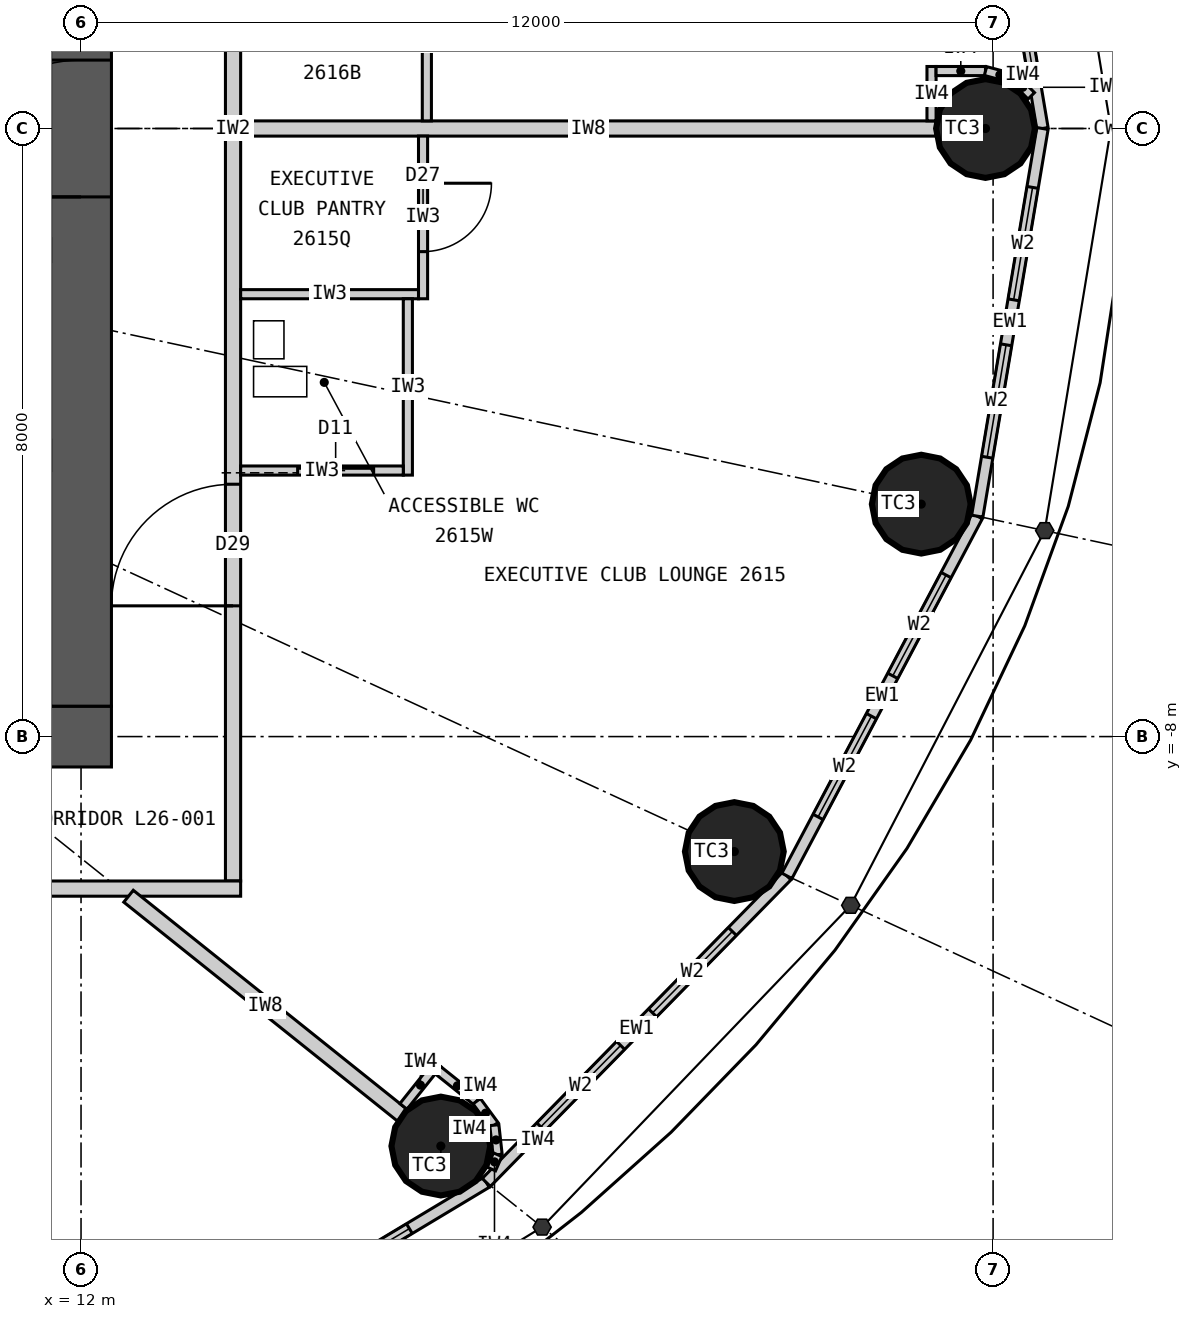
"""IFC4 building model, lengths in metres.
Left out: names, types, materials, properties, quantities, classifications, styles, units other than length and angle.
Written with IfcOpenShell. Run it as: python <this file> out.ifc"""

import sys

from ifc_helpers import new_model, si_unit, direction, frame, frame_2d, origin, origin_2d, place, context, subcontext, project, spatial, rectangle, circle, extrude, element, fill, save


model = new_model("IFC4")
c1 = context("Model", 3, precision=1e-05, world=origin(), true_north=direction((0.0, 1.0)))
c2 = subcontext(c1, "Body", "Model", "MODEL_VIEW")
j1 = project(units=[si_unit("LENGTHUNIT", "METRE"), si_unit("PLANEANGLEUNIT", "RADIAN")], contexts=[c1])
p1 = place(None, origin())
s1 = spatial("IfcSite", under=j1, at=p1, CompositionType="ELEMENT")
p2 = place(p1, origin())
s2 = spatial("IfcBuilding", under=s1, at=p2, CompositionType="ELEMENT")
p3 = place(p2, frame((0.0, 0.0, 105.6)))
s3 = spatial("IfcBuildingStorey", under=s2, at=p3, CompositionType="ELEMENT", Elevation=105.6)
for number, where, z_axis, x_axis in (
    (1, (23.9, 0.0, 0.0), (0.0, 0.0, 1.0), (1.0, 0.0, 0.0)),
    (2, (16.734, -13.387, 0.0), (0.0, 0.0, 1.0), (1.0, 0.0, 0.0)),
    (3, (20.596, -9.513, 0.0), (0.0, 0.0, 1.0), (1.0, 0.0, 0.0)),
    (4, (23.055, -4.942, 0.0), (0.0, 0.0, 1.0), (1.0, 0.0, 0.0)),
):
    element("IfcColumn", number, at=place(p3, frame(where, z_axis=z_axis, x_axis=x_axis)), inside=s3, PredefinedType="COLUMN", context=c2, shape_type="SweptSolid", body=[
        extrude(circle(Radius=0.65, at=origin_2d()), origin(), (0.0, 0.0, 1.0), 3.3),
    ])
p4 = place(p3, frame((12.4, -8.0, 0.0), z_axis=(0.0, 0.0, 1.0), x_axis=(-1.0, 0.0, 0.0)))
e5 = element("IfcWall", 5, at=p4, inside=s3, PredefinedType="SHEAR", context=c2, shape_type="SweptSolid", body=[
    extrude(rectangle(XDim=24.8, YDim=0.8, at=frame_2d((12.4, 0.0))), origin(), (0.0, 0.0, 1.0), 3.3),
])
p5 = place(p4, frame((11.1, 0.0, 0.0)))
e6 = element("IfcOpeningElement", 6, at=p5, cuts=e5, PredefinedType="OPENING", context=c2, shape_type="SweptSolid", body=[
    extrude(rectangle(XDim=1.2, YDim=2.2, at=frame_2d((0.6, 1.1))), frame((0.0, 0.41, 0.0), z_axis=(0.0, -1.0, 0.0), x_axis=(1.0, 0.0, 0.0)), (0.0, 0.0, 1.0), 0.82),
])
p6 = place(p4, frame((18.7, 0.0, 0.0)))
e7 = element("IfcOpeningElement", 7, at=p6, cuts=e5, PredefinedType="OPENING", context=c2, shape_type="SweptSolid", body=[
    extrude(rectangle(XDim=0.9, YDim=2.2, at=frame_2d((0.45, 1.1))), frame((0.0, 0.41, 0.0), z_axis=(0.0, -1.0, 0.0), x_axis=(1.0, 0.0, 0.0)), (0.0, 0.0, 1.0), 0.82),
])
p7 = place(p3, frame((12.0, -7.6, 0.0), z_axis=(0.0, 0.0, 1.0), x_axis=(0.0, 1.0, 0.0)))
e8 = element("IfcWall", 8, at=p7, inside=s3, PredefinedType="SHEAR", context=c2, shape_type="SweptSolid", body=[
    extrude(rectangle(XDim=15.2, YDim=0.8, at=frame_2d((7.6, 0.0))), origin(), (0.0, 0.0, 1.0), 3.3),
])
p8 = place(p7, frame((6.7, 0.0, 0.0)))
e9 = element("IfcOpeningElement", 9, at=p8, cuts=e8, PredefinedType="OPENING", context=c2, shape_type="SweptSolid", body=[
    extrude(rectangle(XDim=1.8, YDim=2.2, at=frame_2d((0.9, 1.1))), frame((0.0, 0.41, 0.0), z_axis=(0.0, -1.0, 0.0), x_axis=(1.0, 0.0, 0.0)), (0.0, 0.0, 1.0), 0.82),
])
p9 = place(p3, frame((24.65, 0.0, 0.0), z_axis=(0.0, 0.0, 1.0), x_axis=(-0.165883894218, 0.986145290329, 0.0)))
e10 = element("IfcWall", 10, at=p9, inside=s3, PredefinedType="ELEMENTEDWALL", context=c2, shape_type="SweptSolid", body=[
    extrude(rectangle(XDim=5.172, YDim=0.15, at=frame_2d((2.586, 0.0))), origin(), (0.0, 0.0, 1.0), 3.12),
])
p10 = place(p9, frame((0.786, 0.0, 0.9)))
e11 = element("IfcOpeningElement", 11, at=p10, cuts=e10, PredefinedType="OPENING", context=c2, shape_type="SweptSolid", body=[
    extrude(rectangle(XDim=1.5, YDim=1.9, at=frame_2d((0.75, 0.95))), frame((0.0, 0.085, 0.0), z_axis=(0.0, -1.0, 0.0), x_axis=(1.0, 0.0, 0.0)), (0.0, 0.0, 1.0), 0.17),
])
p11 = place(p9, frame((2.886, 0.0, 0.9)))
e12 = element("IfcOpeningElement", 12, at=p11, cuts=e10, PredefinedType="OPENING", context=c2, shape_type="SweptSolid", body=[
    extrude(rectangle(XDim=1.5, YDim=1.9, at=frame_2d((0.75, 0.95))), frame((0.0, 0.085, 0.0), z_axis=(0.0, -1.0, 0.0), x_axis=(1.0, 0.0, 0.0)), (0.0, 0.0, 1.0), 0.17),
])
p12 = place(p3, frame((12.221, -16.935, 0.0), z_axis=(0.0, 0.0, 1.0), x_axis=(0.857308573723, 0.514802884044, 0.0)))
e13 = element("IfcWall", 13, at=p12, inside=s3, PredefinedType="ELEMENTEDWALL", context=c2, shape_type="SweptSolid", body=[
    extrude(rectangle(XDim=5.961, YDim=0.15, at=frame_2d((2.98, 0.0))), origin(), (0.0, 0.0, 1.0), 3.12),
])
p13 = place(p12, frame((1.181, 0.0, 0.9)))
e14 = element("IfcOpeningElement", 14, at=p13, cuts=e13, PredefinedType="OPENING", context=c2, shape_type="SweptSolid", body=[
    extrude(rectangle(XDim=1.5, YDim=1.9, at=frame_2d((0.75, 0.95))), frame((0.0, 0.085, 0.0), z_axis=(0.0, -1.0, 0.0), x_axis=(1.0, 0.0, 0.0)), (0.0, 0.0, 1.0), 0.17),
])
p14 = place(p12, frame((3.281, 0.0, 0.9)))
e15 = element("IfcOpeningElement", 15, at=p14, cuts=e13, PredefinedType="OPENING", context=c2, shape_type="SweptSolid", body=[
    extrude(rectangle(XDim=1.5, YDim=1.9, at=frame_2d((0.75, 0.95))), frame((0.0, 0.085, 0.0), z_axis=(0.0, -1.0, 0.0), x_axis=(1.0, 0.0, 0.0)), (0.0, 0.0, 1.0), 0.17),
])
p15 = place(p3, frame((17.332, -13.866, 0.0), z_axis=(0.0, 0.0, 1.0), x_axis=(0.700136650834, 0.714008872605, 0.0)))
e16 = element("IfcWall", 16, at=p15, inside=s3, PredefinedType="ELEMENTEDWALL", context=c2, shape_type="SweptSolid", body=[
    extrude(rectangle(XDim=5.649, YDim=0.15, at=frame_2d((2.825, 0.0))), origin(), (0.0, 0.0, 1.0), 3.12),
])
p16 = place(p15, frame((1.025, 0.0, 0.9)))
e17 = element("IfcOpeningElement", 17, at=p16, cuts=e16, PredefinedType="OPENING", context=c2, shape_type="SweptSolid", body=[
    extrude(rectangle(XDim=1.5, YDim=1.9, at=frame_2d((0.75, 0.95))), frame((0.0, 0.085, 0.0), z_axis=(0.0, -1.0, 0.0), x_axis=(1.0, 0.0, 0.0)), (0.0, 0.0, 1.0), 0.17),
])
p17 = place(p15, frame((3.125, 0.0, 0.9)))
e18 = element("IfcOpeningElement", 18, at=p17, cuts=e16, PredefinedType="OPENING", context=c2, shape_type="SweptSolid", body=[
    extrude(rectangle(XDim=1.5, YDim=1.9, at=frame_2d((0.75, 0.95))), frame((0.0, 0.085, 0.0), z_axis=(0.0, -1.0, 0.0), x_axis=(1.0, 0.0, 0.0)), (0.0, 0.0, 1.0), 0.17),
])
p18 = place(p3, frame((21.287, -9.832, 0.0), z_axis=(0.0, 0.0, 1.0), x_axis=(0.467814388454, 0.883826735257, 0.0)))
e19 = element("IfcWall", 19, at=p18, inside=s3, PredefinedType="ELEMENTEDWALL", context=c2, shape_type="SweptSolid", body=[
    extrude(rectangle(XDim=5.354, YDim=0.15, at=frame_2d((2.677, 0.0))), origin(), (0.0, 0.0, 1.0), 3.12),
])
p19 = place(p18, frame((0.877, 0.0, 0.9)))
e20 = element("IfcOpeningElement", 20, at=p19, cuts=e19, PredefinedType="OPENING", context=c2, shape_type="SweptSolid", body=[
    extrude(rectangle(XDim=1.5, YDim=1.9, at=frame_2d((0.75, 0.95))), frame((0.0, 0.085, 0.0), z_axis=(0.0, -1.0, 0.0), x_axis=(1.0, 0.0, 0.0)), (0.0, 0.0, 1.0), 0.17),
])
p20 = place(p18, frame((2.977, 0.0, 0.9)))
e21 = element("IfcOpeningElement", 21, at=p20, cuts=e19, PredefinedType="OPENING", context=c2, shape_type="SweptSolid", body=[
    extrude(rectangle(XDim=1.5, YDim=1.9, at=frame_2d((0.75, 0.95))), frame((0.0, 0.085, 0.0), z_axis=(0.0, -1.0, 0.0), x_axis=(1.0, 0.0, 0.0)), (0.0, 0.0, 1.0), 0.17),
])
p21 = place(p3, frame((23.792, -5.1, 0.0), z_axis=(0.0, 0.0, 1.0), x_axis=(0.165883894218, 0.986145290329, 0.0)))
e22 = element("IfcWall", 22, at=p21, inside=s3, PredefinedType="ELEMENTEDWALL", context=c2, shape_type="SweptSolid", body=[
    extrude(rectangle(XDim=5.172, YDim=0.15, at=frame_2d((2.586, 0.0))), origin(), (0.0, 0.0, 1.0), 3.12),
])
p22 = place(p21, frame((0.786, 0.0, 0.9)))
e23 = element("IfcOpeningElement", 23, at=p22, cuts=e22, PredefinedType="OPENING", context=c2, shape_type="SweptSolid", body=[
    extrude(rectangle(XDim=1.5, YDim=1.9, at=frame_2d((0.75, 0.95))), frame((0.0, 0.085, 0.0), z_axis=(0.0, -1.0, 0.0), x_axis=(1.0, 0.0, 0.0)), (0.0, 0.0, 1.0), 0.17),
])
p23 = place(p21, frame((2.886, 0.0, 0.9)))
e24 = element("IfcOpeningElement", 24, at=p23, cuts=e22, PredefinedType="OPENING", context=c2, shape_type="SweptSolid", body=[
    extrude(rectangle(XDim=1.5, YDim=1.9, at=frame_2d((0.75, 0.95))), frame((0.0, 0.085, 0.0), z_axis=(0.0, -1.0, 0.0), x_axis=(1.0, 0.0, 0.0)), (0.0, 0.0, 1.0), 0.17),
])
p24 = place(p3, frame((14.0, -9.9, 0.0), z_axis=(0.0, 0.0, 1.0), x_axis=(0.0, 1.0, 0.0)))
e25 = element("IfcWall", 25, at=p24, inside=s3, PredefinedType="PARTITIONING", context=c2, shape_type="SweptSolid", body=[
    extrude(rectangle(XDim=19.8, YDim=0.2, at=frame_2d((9.9, 0.0))), origin(), (0.0, 0.0, 1.0), 3.12),
])
p25 = place(p24, frame((3.62, 0.0, 0.0)))
e26 = element("IfcOpeningElement", 26, at=p25, cuts=e25, PredefinedType="OPENING", context=c2, shape_type="SweptSolid", body=[
    extrude(rectangle(XDim=1.6, YDim=2.4, at=frame_2d((0.8, 1.2))), frame((0.0, 0.11, 0.0), z_axis=(0.0, -1.0, 0.0), x_axis=(1.0, 0.0, 0.0)), (0.0, 0.0, 1.0), 0.22),
])
p26 = place(p24, frame((12.26, 0.0, 0.0)))
e27 = element("IfcOpeningElement", 27, at=p26, cuts=e25, PredefinedType="OPENING", context=c2, shape_type="SweptSolid", body=[
    extrude(rectangle(XDim=1.0, YDim=2.2, at=frame_2d((0.5, 1.1))), frame((0.0, 0.11, 0.0), z_axis=(0.0, -1.0, 0.0), x_axis=(1.0, 0.0, 0.0)), (0.0, 0.0, 1.0), 0.22),
])
p27 = place(p24, frame((17.777, 0.0, 0.0)))
e28 = element("IfcOpeningElement", 28, at=p27, cuts=e25, PredefinedType="OPENING", context=c2, shape_type="SweptSolid", body=[
    extrude(rectangle(XDim=1.0, YDim=2.2, at=frame_2d((0.5, 1.1))), frame((0.0, 0.11, 0.0), z_axis=(0.0, -1.0, 0.0), x_axis=(1.0, 0.0, 0.0)), (0.0, 0.0, 1.0), 0.22),
])
p28 = place(p3, frame((14.1, -10.0, 0.0), z_axis=(0.0, 0.0, 1.0), x_axis=(-1.0, 0.0, 0.0)))
e29 = element("IfcWall", 29, at=p28, inside=s3, PredefinedType="PARTITIONING", context=c2, shape_type="SweptSolid", body=[
    extrude(rectangle(XDim=10.817, YDim=0.2, at=frame_2d((5.409, 0.0))), origin(), (0.0, 0.0, 1.0), 3.12),
])
p29 = place(p3, frame((14.1, 0.0, 0.0), z_axis=(0.0, 0.0, 1.0), x_axis=(1.0, 0.0, 0.0)))
e30 = element("IfcWall", 30, at=p29, inside=s3, PredefinedType="PARTITIONING", context=c2, shape_type="SweptSolid", body=[
    extrude(rectangle(XDim=9.15, YDim=0.2, at=frame_2d((4.575, 0.0))), origin(), (0.0, 0.0, 1.0), 2.27),
])
p30 = place(p3, frame((12.625, -10.1, 0.0), z_axis=(0.0, 0.0, 1.0), x_axis=(0.780863644897, -0.624701503182, 0.0)))
e31 = element("IfcWall", 31, at=p30, inside=s3, PredefinedType="PARTITIONING", context=c2, shape_type="SweptSolid", body=[
    extrude(rectangle(XDim=4.612, YDim=0.2, at=frame_2d((2.306, 0.0))), origin(), (0.0, 0.0, 1.0), 2.27),
])
p31 = place(p3, frame((16.5, -0.1, 0.0), z_axis=(0.0, 0.0, 1.0), x_axis=(0.0, -1.0, 0.0)))
e32 = element("IfcWall", 32, at=p31, inside=s3, PredefinedType="PARTITIONING", context=c2, shape_type="SweptSolid", body=[
    extrude(rectangle(XDim=2.14, YDim=0.12, at=frame_2d((1.07, 0.0))), origin(), (0.0, 0.0, 1.0), 3.12),
])
p32 = place(p31, frame((0.62, 0.0, 0.0)))
e33 = element("IfcOpeningElement", 33, at=p32, cuts=e32, PredefinedType="OPENING", context=c2, shape_type="SweptSolid", body=[
    extrude(rectangle(XDim=0.9, YDim=2.1, at=frame_2d((0.45, 1.05))), frame((0.0, 0.07, 0.0), z_axis=(0.0, -1.0, 0.0), x_axis=(1.0, 0.0, 0.0)), (0.0, 0.0, 1.0), 0.14),
])
p33 = place(p3, frame((14.1, -2.18, 0.0), z_axis=(0.0, 0.0, 1.0), x_axis=(1.0, 0.0, 0.0)))
e34 = element("IfcWall", 34, at=p33, inside=s3, PredefinedType="PARTITIONING", context=c2, shape_type="SweptSolid", body=[
    extrude(rectangle(XDim=2.34, YDim=0.12, at=frame_2d((1.17, 0.0))), origin(), (0.0, 0.0, 1.0), 3.12),
])
p34 = place(p3, frame((16.3, -2.24, 0.0), z_axis=(0.0, 0.0, 1.0), x_axis=(0.0, -1.0, 0.0)))
e35 = element("IfcWall", 35, at=p34, inside=s3, PredefinedType="PARTITIONING", context=c2, shape_type="SweptSolid", body=[
    extrude(rectangle(XDim=2.32, YDim=0.12, at=frame_2d((1.16, 0.0))), origin(), (0.0, 0.0, 1.0), 3.12),
])
p35 = place(p3, frame((14.1, -4.5, 0.0), z_axis=(0.0, 0.0, 1.0), x_axis=(1.0, 0.0, 0.0)))
e36 = element("IfcWall", 36, at=p35, inside=s3, PredefinedType="PARTITIONING", context=c2, shape_type="SweptSolid", body=[
    extrude(rectangle(XDim=2.14, YDim=0.12, at=frame_2d((1.07, 0.0))), origin(), (0.0, 0.0, 1.0), 3.12),
])
p36 = place(p35, frame((0.75, 0.0, 0.0)))
e37 = element("IfcOpeningElement", 37, at=p36, cuts=e36, PredefinedType="OPENING", context=c2, shape_type="SweptSolid", body=[
    extrude(rectangle(XDim=1.0, YDim=2.2, at=frame_2d((0.5, 1.1))), frame((0.0, 0.07, 0.0), z_axis=(0.0, -1.0, 0.0), x_axis=(1.0, 0.0, 0.0)), (0.0, 0.0, 1.0), 0.14),
])
p37 = place(p3, frame((16.55, 0.1, 0.0), z_axis=(0.0, 0.0, 1.0), x_axis=(0.0, 1.0, 0.0)))
e38 = element("IfcWall", 38, at=p37, inside=s3, PredefinedType="PARTITIONING", context=c2, shape_type="SweptSolid", body=[
    extrude(rectangle(XDim=2.14, YDim=0.12, at=frame_2d((1.07, 0.0))), origin(), (0.0, 0.0, 1.0), 3.12),
])
p38 = place(p3, frame((23.19, 0.1, 0.0), z_axis=(0.0, 0.0, 1.0), x_axis=(0.0, 1.0, 0.0)))
e39 = element("IfcWall", 39, at=p38, inside=s3, PredefinedType="PARTITIONING", context=c2, shape_type="SweptSolid", body=[
    extrude(rectangle(XDim=0.716, YDim=0.12, at=frame_2d((0.358, 0.0))), origin(), (0.0, 0.0, 1.0), 3.12),
])
p39 = place(p3, frame((23.25, 0.756, 0.0), z_axis=(0.0, 0.0, 1.0), x_axis=(1.0, 0.0, 0.0)))
e40 = element("IfcWall", 40, at=p39, inside=s3, PredefinedType="PARTITIONING", context=c2, shape_type="SweptSolid", body=[
    extrude(rectangle(XDim=0.65, YDim=0.12, at=frame_2d((0.325, 0.0))), origin(), (0.0, 0.0, 1.0), 3.12),
])
p40 = place(p3, frame((23.9, 0.756, 0.0), z_axis=(0.0, 0.0, 1.0), x_axis=(0.965892334856, -0.2589440045, 0.0)))
e41 = element("IfcWall", 41, at=p40, inside=s3, PredefinedType="PARTITIONING", context=c2, shape_type="SweptSolid", body=[
    extrude(rectangle(XDim=0.391, YDim=0.12, at=frame_2d((0.196, 0.0))), origin(), (0.0, 0.0, 1.0), 3.12),
])
p41 = place(p3, frame((24.278, 0.655, 0.0), z_axis=(0.0, 0.0, 1.0), x_axis=(0.707106781187, -0.707106781187, 0.0)))
e42 = element("IfcWall", 42, at=p41, inside=s3, PredefinedType="PARTITIONING", context=c2, shape_type="SweptSolid", body=[
    extrude(rectangle(XDim=0.318, YDim=0.12, at=frame_2d((0.159, 0.0))), origin(), (0.0, 0.0, 1.0), 3.12),
])
p42 = place(p3, frame((16.242, -12.865, 0.0), z_axis=(0.0, 0.0, 1.0), x_axis=(0.624861414622, 0.780735686719, 0.0)))
e43 = element("IfcWall", 43, at=p42, inside=s3, PredefinedType="PARTITIONING", context=c2, shape_type="SweptSolid", body=[
    extrude(rectangle(XDim=0.716, YDim=0.12, at=frame_2d((0.358, 0.0))), origin(), (0.0, 0.0, 1.0), 3.12),
])
p43 = place(p3, frame((16.698, -12.391, 0.0), z_axis=(0.0, 0.0, 1.0), x_axis=(0.780722240533, -0.624878214645, 0.0)))
e44 = element("IfcWall", 44, at=p43, inside=s3, PredefinedType="PARTITIONING", context=c2, shape_type="SweptSolid", body=[
    extrude(rectangle(XDim=0.65, YDim=0.12, at=frame_2d((0.325, 0.0))), origin(), (0.0, 0.0, 1.0), 3.12),
])
p44 = place(p3, frame((17.206, -12.797, 0.0), z_axis=(0.0, 0.0, 1.0), x_axis=(0.592986095904, -0.805212698648, 0.0)))
e45 = element("IfcWall", 45, at=p44, inside=s3, PredefinedType="PARTITIONING", context=c2, shape_type="SweptSolid", body=[
    extrude(rectangle(XDim=0.391, YDim=0.12, at=frame_2d((0.196, 0.0))), origin(), (0.0, 0.0, 1.0), 3.12),
])
p45 = place(p3, frame((17.438, -13.112, 0.0), z_axis=(0.0, 0.0, 1.0), x_axis=(0.109815164188, -0.993952025862, 0.0)))
e46 = element("IfcWall", 46, at=p45, inside=s3, PredefinedType="PARTITIONING", context=c2, shape_type="SweptSolid", body=[
    extrude(rectangle(XDim=0.391, YDim=0.12, at=frame_2d((0.196, 0.0))), origin(), (0.0, 0.0, 1.0), 3.12),
])
p46 = place(p3, frame((17.481, -13.501, 0.0), z_axis=(0.0, 0.0, 1.0), x_axis=(-0.401504188288, -0.915857186895, 0.0)))
e47 = element("IfcWall", 47, at=p46, inside=s3, PredefinedType="PARTITIONING", context=c2, shape_type="SweptSolid", body=[
    extrude(rectangle(XDim=0.206, YDim=0.12, at=frame_2d((0.103, 0.0))), origin(), (0.0, 0.0, 1.0), 3.12),
])
p47 = place(p10, origin())
e48 = element("IfcWindow", 48, at=p47, inside=s3, PartitioningType="SINGLE_PANEL", PredefinedType="WINDOW", context=c2, shape_type="SweptSolid", body=[
    extrude(rectangle(XDim=1.5, YDim=1.9, at=frame_2d((0.75, 0.95))), frame((0.0, 0.03, 0.0), z_axis=(0.0, -1.0, 0.0), x_axis=(1.0, 0.0, 0.0)), (0.0, 0.0, 1.0), 0.06),
])
fill(e11, e48)
p48 = place(p14, origin())
e49 = element("IfcWindow", 49, at=p48, inside=s3, PartitioningType="SINGLE_PANEL", PredefinedType="WINDOW", context=c2, shape_type="SweptSolid", body=[
    extrude(rectangle(XDim=1.5, YDim=1.9, at=frame_2d((0.75, 0.95))), frame((0.0, 0.03, 0.0), z_axis=(0.0, -1.0, 0.0), x_axis=(1.0, 0.0, 0.0)), (0.0, 0.0, 1.0), 0.06),
])
fill(e15, e49)
p49 = place(p16, origin())
e50 = element("IfcWindow", 50, at=p49, inside=s3, PartitioningType="SINGLE_PANEL", PredefinedType="WINDOW", context=c2, shape_type="SweptSolid", body=[
    extrude(rectangle(XDim=1.5, YDim=1.9, at=frame_2d((0.75, 0.95))), frame((0.0, 0.03, 0.0), z_axis=(0.0, -1.0, 0.0), x_axis=(1.0, 0.0, 0.0)), (0.0, 0.0, 1.0), 0.06),
])
fill(e17, e50)
p50 = place(p17, origin())
e51 = element("IfcWindow", 51, at=p50, inside=s3, PartitioningType="SINGLE_PANEL", PredefinedType="WINDOW", context=c2, shape_type="SweptSolid", body=[
    extrude(rectangle(XDim=1.5, YDim=1.9, at=frame_2d((0.75, 0.95))), frame((0.0, 0.03, 0.0), z_axis=(0.0, -1.0, 0.0), x_axis=(1.0, 0.0, 0.0)), (0.0, 0.0, 1.0), 0.06),
])
fill(e18, e51)
p51 = place(p19, origin())
e52 = element("IfcWindow", 52, at=p51, inside=s3, PartitioningType="SINGLE_PANEL", PredefinedType="WINDOW", context=c2, shape_type="SweptSolid", body=[
    extrude(rectangle(XDim=1.5, YDim=1.9, at=frame_2d((0.75, 0.95))), frame((0.0, 0.03, 0.0), z_axis=(0.0, -1.0, 0.0), x_axis=(1.0, 0.0, 0.0)), (0.0, 0.0, 1.0), 0.06),
])
fill(e20, e52)
p52 = place(p20, origin())
e53 = element("IfcWindow", 53, at=p52, inside=s3, PartitioningType="SINGLE_PANEL", PredefinedType="WINDOW", context=c2, shape_type="SweptSolid", body=[
    extrude(rectangle(XDim=1.5, YDim=1.9, at=frame_2d((0.75, 0.95))), frame((0.0, 0.03, 0.0), z_axis=(0.0, -1.0, 0.0), x_axis=(1.0, 0.0, 0.0)), (0.0, 0.0, 1.0), 0.06),
])
fill(e21, e53)
p53 = place(p22, origin())
e54 = element("IfcWindow", 54, at=p53, inside=s3, PartitioningType="SINGLE_PANEL", PredefinedType="WINDOW", context=c2, shape_type="SweptSolid", body=[
    extrude(rectangle(XDim=1.5, YDim=1.9, at=frame_2d((0.75, 0.95))), frame((0.0, 0.03, 0.0), z_axis=(0.0, -1.0, 0.0), x_axis=(1.0, 0.0, 0.0)), (0.0, 0.0, 1.0), 0.06),
])
fill(e23, e54)
p54 = place(p23, origin())
e55 = element("IfcWindow", 55, at=p54, inside=s3, PartitioningType="SINGLE_PANEL", PredefinedType="WINDOW", context=c2, shape_type="SweptSolid", body=[
    extrude(rectangle(XDim=1.5, YDim=1.9, at=frame_2d((0.75, 0.95))), frame((0.0, 0.03, 0.0), z_axis=(0.0, -1.0, 0.0), x_axis=(1.0, 0.0, 0.0)), (0.0, 0.0, 1.0), 0.06),
])
fill(e24, e55)
p55 = place(p32, origin())
e56 = element("IfcDoor", 56, at=p55, inside=s3, OperationType="SINGLE_SWING_LEFT", PredefinedType="DOOR", context=c2, shape_type="SweptSolid", body=[
    extrude(rectangle(XDim=0.9, YDim=2.1, at=frame_2d((0.45, 1.05))), frame((0.0, 0.025, 0.0), z_axis=(0.0, -1.0, 0.0), x_axis=(1.0, 0.0, 0.0)), (0.0, 0.0, 1.0), 0.05),
])
fill(e33, e56)
p56 = place(p36, origin())
e57 = element("IfcDoor", 57, at=p56, inside=s3, OperationType="SLIDING_TO_LEFT", PredefinedType="DOOR", context=c2, shape_type="SweptSolid", body=[
    extrude(rectangle(XDim=1.0, YDim=2.2, at=frame_2d((0.5, 1.1))), frame((0.0, 0.025, 0.0), z_axis=(0.0, -1.0, 0.0), x_axis=(1.0, 0.0, 0.0)), (0.0, 0.0, 1.0), 0.05),
])
fill(e37, e57)
p57 = place(p25, origin())
e58 = element("IfcDoor", 58, at=p57, inside=s3, OperationType="DOUBLE_DOOR_DOUBLE_SWING", PredefinedType="DOOR", context=c2, shape_type="SweptSolid", body=[
    extrude(rectangle(XDim=1.6, YDim=2.4, at=frame_2d((0.8, 1.2))), frame((0.0, 0.025, 0.0), z_axis=(0.0, -1.0, 0.0), x_axis=(1.0, 0.0, 0.0)), (0.0, 0.0, 1.0), 0.05),
])
fill(e26, e58)
p58 = place(p8, origin())
e59 = element("IfcDoor", 59, at=p58, inside=s3, OperationType="DOUBLE_DOOR_DOUBLE_SWING", PredefinedType="DOOR", context=c2, shape_type="SweptSolid", body=[
    extrude(rectangle(XDim=1.8, YDim=2.2, at=frame_2d((0.9, 1.1))), frame((0.0, 0.025, 0.0), z_axis=(0.0, -1.0, 0.0), x_axis=(1.0, 0.0, 0.0)), (0.0, 0.0, 1.0), 0.05),
])
fill(e9, e59)
save(model, sys.argv[1])
